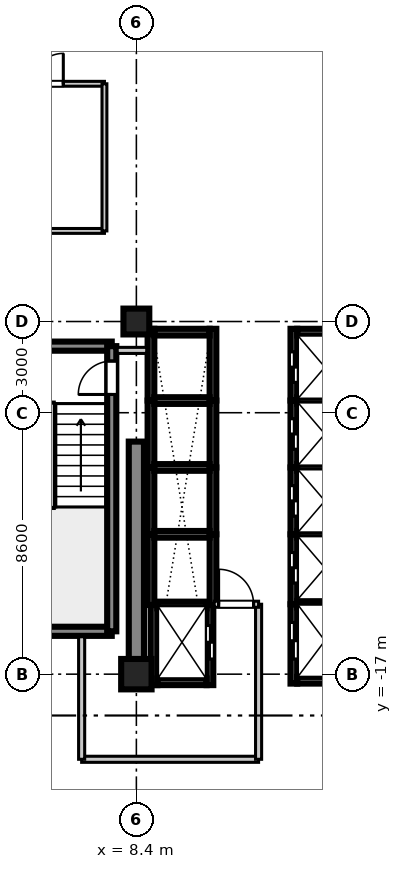
"""IFC4 building model, lengths in metres.
Left out: names, types, materials, properties, quantities, classifications, styles, units other than length and angle.
Written with IfcOpenShell. Run it as: python <this file> out.ifc"""

import sys

from ifc_helpers import new_model, si_unit, direction, frame, frame_2d, origin, origin_2d, place, context, subcontext, project, spatial, rectangle, extrude, source, transform, mapped, element, fill, save


model = new_model("IFC4")
c1 = context("Model", 3, precision=1e-05, world=origin(), true_north=direction((0.0, 1.0)))
c2 = subcontext(c1, "Body", "Model", "MODEL_VIEW")
j1 = project(units=[si_unit("LENGTHUNIT", "METRE"), si_unit("PLANEANGLEUNIT", "RADIAN")], contexts=[c1])
p1 = place(None, origin())
s1 = spatial("IfcSite", under=j1, at=p1, CompositionType="ELEMENT")
p2 = place(p1, origin())
s2 = spatial("IfcBuilding", under=s1, at=p2, CompositionType="ELEMENT")
p3 = place(p2, frame((0.0, 0.0, 204.9)))
s3 = spatial("IfcBuildingStorey", under=s2, at=p3, CompositionType="ELEMENT", Elevation=204.9)
m1 = source(origin(), c2, "Body", "SweptSolid", [
    extrude(rectangle(XDim=1.0, YDim=1.0, at=origin_2d()), origin(), (0.0, 0.0, 1.0), 3.655),
])
p4 = place(p3, frame((8.4, -17.0, 0.0), z_axis=(0.0, 0.0, 1.0), x_axis=(1.0, 0.0, 0.0)))
e1 = element("IfcColumn", 1, at=p4, inside=s3, PredefinedType="COLUMN", context=c2, shape_type="MappedRepresentation", body=[
    mapped(m1, transform((0.0, 0.0, 0.0), scale=1.0)),
])
m2 = source(origin(), c2, "Body", "SweptSolid", [
    extrude(rectangle(XDim=0.85, YDim=0.85, at=origin_2d()), origin(), (0.0, 0.0, 1.0), 3.655),
])
p5 = place(p3, frame((8.4, -5.4, 0.0), z_axis=(0.0, 0.0, 1.0), x_axis=(1.0, 0.0, 0.0)))
e2 = element("IfcColumn", 2, at=p5, inside=s3, PredefinedType="PILASTER", context=c2, shape_type="MappedRepresentation", body=[
    mapped(m2, transform((0.0, 0.0, 0.0), scale=1.0)),
])
m3 = source(origin(), c2, "Body", "SweptSolid", [
    extrude(rectangle(XDim=7.65, YDim=0.5, at=frame_2d((3.825, 0.0))), origin(), (0.0, 0.0, 1.0), 3.41),
])
p6 = place(p3, frame((8.4, -17.0, 0.0), z_axis=(0.0, 0.0, 1.0), x_axis=(0.0, 1.0, 0.0)))
e3 = element("IfcWall", 3, at=p6, inside=s3, PredefinedType="SHEAR", context=c2, shape_type="MappedRepresentation", body=[
    mapped(m3, transform((0.0, 0.0, 0.0), scale=1.0)),
])
m4 = source(origin(), c2, "Body", "SweptSolid", [
    extrude(rectangle(XDim=3.98, YDim=0.3, at=frame_2d((1.99, 0.0))), origin(), (0.0, 0.0, 1.0), 3.41),
])
for number, where, z_axis, x_axis in (
    (4, (3.61, -15.59, 0.0), (0.0, 0.0, 1.0), (1.0, 0.0, 0.0)),
    (5, (3.61, -6.21, 0.0), (0.0, 0.0, 1.0), (1.0, 0.0, 0.0)),
):
    element("IfcWall", number, at=place(p3, frame(where, z_axis=z_axis, x_axis=x_axis)), inside=s3, PredefinedType="SHEAR", context=c2, shape_type="MappedRepresentation", body=[
        mapped(m4, transform((0.0, 0.0, 0.0), scale=1.0)),
    ])
m5 = source(origin(), c2, "Body", "SweptSolid", [
    extrude(rectangle(XDim=9.38, YDim=0.3, at=frame_2d((4.69, 0.0))), origin(), (0.0, 0.0, 1.0), 3.41),
])
p7 = place(p3, frame((7.59, -15.59, 0.0), z_axis=(0.0, 0.0, 1.0), x_axis=(0.0, 1.0, 0.0)))
e6 = element("IfcWall", 6, at=p7, inside=s3, PredefinedType="SHEAR", context=c2, shape_type="MappedRepresentation", body=[
    mapped(m5, transform((0.0, 0.0, 0.0), scale=1.0)),
])
p8 = place(p7, frame((7.79, 0.0, 0.0)))
e7 = element("IfcOpeningElement", 7, at=p8, cuts=e6, PredefinedType="OPENING", context=c2, shape_type="SweptSolid", body=[
    extrude(rectangle(XDim=1.1, YDim=2.15, at=frame_2d((0.55, 1.075))), frame((0.0, 0.16, 0.0), z_axis=(0.0, -1.0, 0.0), x_axis=(1.0, 0.0, 0.0)), (0.0, 0.0, 1.0), 0.32),
])
m6 = source(origin(), c2, "Body", "SweptSolid", [
    extrude(rectangle(XDim=2.36, YDim=0.22, at=frame_2d((1.18, 0.0))), origin(), (0.0, 0.0, 1.0), 3.41),
])
p9 = place(p3, frame((13.58, -8.0, 0.0), z_axis=(0.0, 0.0, 1.0), x_axis=(0.0, 1.0, 0.0)))
e8 = element("IfcWall", 8, at=p9, inside=s3, PredefinedType="SHEAR", context=c2, shape_type="MappedRepresentation", body=[
    mapped(m6, transform((0.0, 0.0, 0.0), scale=1.0)),
])
p10 = place(p9, frame((0.6, 0.0, 0.0)))
e9 = element("IfcOpeningElement", 9, at=p10, cuts=e8, PredefinedType="OPENING", context=c2, shape_type="SweptSolid", body=[
    extrude(rectangle(XDim=1.0, YDim=2.2, at=frame_2d((0.5, 1.1))), frame((0.0, 0.12, 0.0), z_axis=(0.0, -1.0, 0.0), x_axis=(1.0, 0.0, 0.0)), (0.0, 0.0, 1.0), 0.24),
])
m7 = source(origin(), c2, "Body", "SweptSolid", [
    extrude(rectangle(XDim=1.82, YDim=0.22, at=frame_2d((0.91, 0.0))), origin(), (0.0, 0.0, 1.0), 3.41),
])
p11 = place(p3, frame((13.69, -5.75, 0.0), z_axis=(0.0, 0.0, 1.0), x_axis=(1.0, 0.0, 0.0)))
e10 = element("IfcWall", 10, at=p11, inside=s3, PredefinedType="SHEAR", context=c2, shape_type="MappedRepresentation", body=[
    mapped(m7, transform((0.0, 0.0, 0.0), scale=1.0)),
])
m8 = source(origin(), c2, "Body", "SweptSolid", [
    extrude(rectangle(XDim=2.2, YDim=0.22, at=frame_2d((1.1, 0.0))), origin(), (0.0, 0.0, 1.0), 3.41),
])
p12 = place(p3, frame((13.58, -10.2, 0.0), z_axis=(0.0, 0.0, 1.0), x_axis=(0.0, 1.0, 0.0)))
e11 = element("IfcWall", 11, at=p12, inside=s3, PredefinedType="SHEAR", context=c2, shape_type="MappedRepresentation", body=[
    mapped(m8, transform((0.0, 0.0, 0.0), scale=1.0)),
])
p13 = place(p12, frame((0.6, 0.0, 0.0)))
e12 = element("IfcOpeningElement", 12, at=p13, cuts=e11, PredefinedType="OPENING", context=c2, shape_type="SweptSolid", body=[
    extrude(rectangle(XDim=1.0, YDim=2.2, at=frame_2d((0.5, 1.1))), frame((0.0, 0.12, 0.0), z_axis=(0.0, -1.0, 0.0), x_axis=(1.0, 0.0, 0.0)), (0.0, 0.0, 1.0), 0.24),
])
m9 = source(origin(), c2, "Body", "SweptSolid", [
    extrude(rectangle(XDim=1.82, YDim=0.22, at=frame_2d((0.91, 0.0))), origin(), (0.0, 0.0, 1.0), 3.7),
])
p14 = place(p3, frame((13.69, -8.0, 0.0), z_axis=(0.0, 0.0, 1.0), x_axis=(1.0, 0.0, 0.0)))
e13 = element("IfcWall", 13, at=p14, inside=s3, PredefinedType="SHEAR", context=c2, shape_type="MappedRepresentation", body=[
    mapped(m9, transform((0.0, 0.0, 0.0), scale=1.0)),
])
p15 = place(p3, frame((13.58, -12.4, 0.0), z_axis=(0.0, 0.0, 1.0), x_axis=(0.0, 1.0, 0.0)))
e14 = element("IfcWall", 14, at=p15, inside=s3, PredefinedType="SHEAR", context=c2, shape_type="MappedRepresentation", body=[
    mapped(m8, transform((0.0, 0.0, 0.0), scale=1.0)),
])
p16 = place(p15, frame((0.6, 0.0, 0.0)))
e15 = element("IfcOpeningElement", 15, at=p16, cuts=e14, PredefinedType="OPENING", context=c2, shape_type="SweptSolid", body=[
    extrude(rectangle(XDim=1.0, YDim=2.2, at=frame_2d((0.5, 1.1))), frame((0.0, 0.12, 0.0), z_axis=(0.0, -1.0, 0.0), x_axis=(1.0, 0.0, 0.0)), (0.0, 0.0, 1.0), 0.24),
])
p17 = place(p3, frame((13.69, -10.2, 0.0), z_axis=(0.0, 0.0, 1.0), x_axis=(1.0, 0.0, 0.0)))
e16 = element("IfcWall", 16, at=p17, inside=s3, PredefinedType="SHEAR", context=c2, shape_type="MappedRepresentation", body=[
    mapped(m9, transform((0.0, 0.0, 0.0), scale=1.0)),
])
m10 = source(origin(), c2, "Body", "SweptSolid", [
    extrude(rectangle(XDim=2.3, YDim=0.22, at=frame_2d((1.15, 0.0))), origin(), (0.0, 0.0, 1.0), 3.41),
])
p18 = place(p3, frame((13.58, -14.7, 0.0), z_axis=(0.0, 0.0, 1.0), x_axis=(0.0, 1.0, 0.0)))
e17 = element("IfcWall", 17, at=p18, inside=s3, PredefinedType="SHEAR", context=c2, shape_type="MappedRepresentation", body=[
    mapped(m10, transform((0.0, 0.0, 0.0), scale=1.0)),
])
p19 = place(p18, frame((0.7, 0.0, 0.0)))
e18 = element("IfcOpeningElement", 18, at=p19, cuts=e17, PredefinedType="OPENING", context=c2, shape_type="SweptSolid", body=[
    extrude(rectangle(XDim=1.0, YDim=2.2, at=frame_2d((0.5, 1.1))), frame((0.0, 0.12, 0.0), z_axis=(0.0, -1.0, 0.0), x_axis=(1.0, 0.0, 0.0)), (0.0, 0.0, 1.0), 0.24),
])
p20 = place(p3, frame((13.69, -12.4, 0.0), z_axis=(0.0, 0.0, 1.0), x_axis=(1.0, 0.0, 0.0)))
e19 = element("IfcWall", 19, at=p20, inside=s3, PredefinedType="SHEAR", context=c2, shape_type="MappedRepresentation", body=[
    mapped(m9, transform((0.0, 0.0, 0.0), scale=1.0)),
])
for number, where, z_axis, x_axis in (
    (20, (8.88, -8.0, 0.0), (0.0, 0.0, 1.0), (0.0, 1.0, 0.0)),
    (21, (10.92, -8.0, 0.0), (0.0, 0.0, 1.0), (0.0, 1.0, 0.0)),
):
    element("IfcWall", number, at=place(p3, frame(where, z_axis=z_axis, x_axis=x_axis)), inside=s3, PredefinedType="SHEAR", context=c2, shape_type="MappedRepresentation", body=[
        mapped(m6, transform((0.0, 0.0, 0.0), scale=1.0)),
    ])
p21 = place(p3, frame((8.99, -5.75, 0.0), z_axis=(0.0, 0.0, 1.0), x_axis=(1.0, 0.0, 0.0)))
e22 = element("IfcWall", 22, at=p21, inside=s3, PredefinedType="SHEAR", context=c2, shape_type="MappedRepresentation", body=[
    mapped(m7, transform((0.0, 0.0, 0.0), scale=1.0)),
])
for number, where, z_axis, x_axis in (
    (23, (8.88, -10.2, 0.0), (0.0, 0.0, 1.0), (0.0, 1.0, 0.0)),
    (24, (10.92, -10.2, 0.0), (0.0, 0.0, 1.0), (0.0, 1.0, 0.0)),
):
    element("IfcWall", number, at=place(p3, frame(where, z_axis=z_axis, x_axis=x_axis)), inside=s3, PredefinedType="SHEAR", context=c2, shape_type="MappedRepresentation", body=[
        mapped(m8, transform((0.0, 0.0, 0.0), scale=1.0)),
    ])
p22 = place(p3, frame((8.99, -8.0, 0.0), z_axis=(0.0, 0.0, 1.0), x_axis=(1.0, 0.0, 0.0)))
e25 = element("IfcWall", 25, at=p22, inside=s3, PredefinedType="SHEAR", context=c2, shape_type="MappedRepresentation", body=[
    mapped(m9, transform((0.0, 0.0, 0.0), scale=1.0)),
])
for number, where, z_axis, x_axis in (
    (26, (8.88, -12.4, 0.0), (0.0, 0.0, 1.0), (0.0, 1.0, 0.0)),
    (27, (10.92, -12.4, 0.0), (0.0, 0.0, 1.0), (0.0, 1.0, 0.0)),
):
    element("IfcWall", number, at=place(p3, frame(where, z_axis=z_axis, x_axis=x_axis)), inside=s3, PredefinedType="SHEAR", context=c2, shape_type="MappedRepresentation", body=[
        mapped(m8, transform((0.0, 0.0, 0.0), scale=1.0)),
    ])
p23 = place(p3, frame((8.99, -10.2, 0.0), z_axis=(0.0, 0.0, 1.0), x_axis=(1.0, 0.0, 0.0)))
e28 = element("IfcWall", 28, at=p23, inside=s3, PredefinedType="SHEAR", context=c2, shape_type="MappedRepresentation", body=[
    mapped(m9, transform((0.0, 0.0, 0.0), scale=1.0)),
])
m11 = source(origin(), c2, "Body", "SweptSolid", [
    extrude(rectangle(XDim=2.325, YDim=0.22, at=frame_2d((1.163, 0.0))), origin(), (0.0, 0.0, 1.0), 3.41),
])
for number, where, z_axis, x_axis in (
    (29, (8.88, -14.725, 0.0), (0.0, 0.0, 1.0), (0.0, 1.0, 0.0)),
    (30, (10.92, -14.725, 0.0), (0.0, 0.0, 1.0), (0.0, 1.0, 0.0)),
):
    element("IfcWall", number, at=place(p3, frame(where, z_axis=z_axis, x_axis=x_axis)), inside=s3, PredefinedType="SHEAR", context=c2, shape_type="MappedRepresentation", body=[
        mapped(m11, transform((0.0, 0.0, 0.0), scale=1.0)),
    ])
p24 = place(p3, frame((8.99, -12.4, 0.0), z_axis=(0.0, 0.0, 1.0), x_axis=(1.0, 0.0, 0.0)))
e31 = element("IfcWall", 31, at=p24, inside=s3, PredefinedType="SHEAR", context=c2, shape_type="MappedRepresentation", body=[
    mapped(m9, transform((0.0, 0.0, 0.0), scale=1.0)),
])
m12 = source(origin(), c2, "Body", "SweptSolid", [
    extrude(rectangle(XDim=2.635, YDim=0.22, at=frame_2d((1.317, 0.0))), origin(), (0.0, 0.0, 1.0), 3.41),
])
p25 = place(p3, frame((8.98, -17.36, 0.0), z_axis=(0.0, 0.0, 1.0), x_axis=(0.0, 1.0, 0.0)))
e32 = element("IfcWall", 32, at=p25, inside=s3, PredefinedType="SHEAR", context=c2, shape_type="MappedRepresentation", body=[
    mapped(m12, transform((0.0, 0.0, 0.0), scale=1.0)),
])
p26 = place(p3, frame((10.82, -17.36, 0.0), z_axis=(0.0, 0.0, 1.0), x_axis=(0.0, 1.0, 0.0)))
e33 = element("IfcWall", 33, at=p26, inside=s3, PredefinedType="SHEAR", context=c2, shape_type="MappedRepresentation", body=[
    mapped(m12, transform((0.0, 0.0, 0.0), scale=1.0)),
])
p27 = place(p26, frame((0.86, 0.0, 0.0)))
e34 = element("IfcOpeningElement", 34, at=p27, cuts=e33, PredefinedType="OPENING", context=c2, shape_type="SweptSolid", body=[
    extrude(rectangle(XDim=1.1, YDim=2.2, at=frame_2d((0.55, 1.1))), frame((0.0, 0.12, 0.0), z_axis=(0.0, -1.0, 0.0), x_axis=(1.0, 0.0, 0.0)), (0.0, 0.0, 1.0), 0.24),
])
m13 = source(origin(), c2, "Body", "SweptSolid", [
    extrude(rectangle(XDim=1.62, YDim=0.22, at=frame_2d((0.81, 0.0))), origin(), (0.0, 0.0, 1.0), 3.41),
])
p28 = place(p3, frame((9.09, -17.25, 0.0), z_axis=(0.0, 0.0, 1.0), x_axis=(1.0, 0.0, 0.0)))
e35 = element("IfcWall", 35, at=p28, inside=s3, PredefinedType="SHEAR", context=c2, shape_type="MappedRepresentation", body=[
    mapped(m13, transform((0.0, 0.0, 0.0), scale=1.0)),
])
m14 = source(origin(), c2, "Body", "SweptSolid", [
    extrude(rectangle(XDim=1.62, YDim=0.22, at=frame_2d((0.81, 0.0))), origin(), (0.0, 0.0, 1.0), 3.7),
])
p29 = place(p3, frame((9.09, -14.725, 0.0), z_axis=(0.0, 0.0, 1.0), x_axis=(1.0, 0.0, 0.0)))
e36 = element("IfcWall", 36, at=p29, inside=s3, PredefinedType="SHEAR", context=c2, shape_type="MappedRepresentation", body=[
    mapped(m14, transform((0.0, 0.0, 0.0), scale=1.0)),
])
m15 = source(origin(), c2, "Body", "SweptSolid", [
    extrude(rectangle(XDim=2.61, YDim=0.22, at=frame_2d((1.305, 0.0))), origin(), (0.0, 0.0, 1.0), 3.41),
])
p30 = place(p3, frame((13.58, -17.31, 0.0), z_axis=(0.0, 0.0, 1.0), x_axis=(0.0, 1.0, 0.0)))
e37 = element("IfcWall", 37, at=p30, inside=s3, PredefinedType="SHEAR", context=c2, shape_type="MappedRepresentation", body=[
    mapped(m15, transform((0.0, 0.0, 0.0), scale=1.0)),
])
p31 = place(p30, frame((0.81, 0.0, 0.0)))
e38 = element("IfcOpeningElement", 38, at=p31, cuts=e37, PredefinedType="OPENING", context=c2, shape_type="SweptSolid", body=[
    extrude(rectangle(XDim=1.2, YDim=2.2, at=frame_2d((0.6, 1.1))), frame((0.0, 0.12, 0.0), z_axis=(0.0, -1.0, 0.0), x_axis=(1.0, 0.0, 0.0)), (0.0, 0.0, 1.0), 0.24),
])
p32 = place(p3, frame((13.69, -17.2, 0.0), z_axis=(0.0, 0.0, 1.0), x_axis=(1.0, 0.0, 0.0)))
e39 = element("IfcWall", 39, at=p32, inside=s3, PredefinedType="SHEAR", context=c2, shape_type="MappedRepresentation", body=[
    mapped(m7, transform((0.0, 0.0, 0.0), scale=1.0)),
])
p33 = place(p3, frame((13.69, -14.7, 0.0), z_axis=(0.0, 0.0, 1.0), x_axis=(1.0, 0.0, 0.0)))
e40 = element("IfcWall", 40, at=p33, inside=s3, PredefinedType="SHEAR", context=c2, shape_type="MappedRepresentation", body=[
    mapped(m9, transform((0.0, 0.0, 0.0), scale=1.0)),
])
m16 = source(origin(), c2, "Body", "SweptSolid", [
    extrude(rectangle(XDim=5.82, YDim=0.2, at=frame_2d((2.91, 0.0))), origin(), (0.0, 0.0, 1.0), 2.75),
])
p34 = place(p3, frame((6.6, -19.8, 0.0), z_axis=(0.0, 0.0, 1.0), x_axis=(1.0, 0.0, 0.0)))
e41 = element("IfcWall", 41, at=p34, inside=s3, PredefinedType="PARTITIONING", context=c2, shape_type="MappedRepresentation", body=[
    mapped(m16, transform((0.0, 0.0, 0.0), scale=1.0)),
])
m17 = source(origin(), c2, "Body", "SweptSolid", [
    extrude(rectangle(XDim=4.03, YDim=0.2, at=frame_2d((2.015, 0.0))), origin(), (0.0, 0.0, 1.0), 2.75),
])
p35 = place(p3, frame((6.6, -19.8, 0.0), z_axis=(0.0, 0.0, 1.0), x_axis=(0.0, 1.0, 0.0)))
e42 = element("IfcWall", 42, at=p35, inside=s3, PredefinedType="PARTITIONING", context=c2, shape_type="MappedRepresentation", body=[
    mapped(m17, transform((0.0, 0.0, 0.0), scale=1.0)),
])
m18 = source(origin(), c2, "Body", "SweptSolid", [
    extrude(rectangle(XDim=5.1, YDim=0.2, at=frame_2d((2.55, 0.0))), origin(), (0.0, 0.0, 1.0), 2.75),
])
p36 = place(p3, frame((12.42, -19.8, 0.0), z_axis=(0.0, 0.0, 1.0), x_axis=(0.0, 1.0, 0.0)))
e43 = element("IfcWall", 43, at=p36, inside=s3, PredefinedType="PARTITIONING", context=c2, shape_type="MappedRepresentation", body=[
    mapped(m18, transform((0.0, 0.0, 0.0), scale=1.0)),
])
m19 = source(origin(), c2, "Body", "SweptSolid", [
    extrude(rectangle(XDim=1.46, YDim=0.2, at=frame_2d((0.73, 0.0))), origin(), (0.0, 0.0, 1.0), 2.75),
])
p37 = place(p3, frame((10.96, -14.7, 0.0), z_axis=(0.0, 0.0, 1.0), x_axis=(1.0, 0.0, 0.0)))
e44 = element("IfcWall", 44, at=p37, inside=s3, PredefinedType="PARTITIONING", context=c2, shape_type="MappedRepresentation", body=[
    mapped(m19, transform((0.0, 0.0, 0.0), scale=1.0)),
])
p38 = place(p37, frame((0.145, 0.0, 0.0)))
e45 = element("IfcOpeningElement", 45, at=p38, cuts=e44, PredefinedType="OPENING", context=c2, shape_type="SweptSolid", body=[
    extrude(rectangle(XDim=1.15, YDim=2.15, at=frame_2d((0.575, 1.075))), frame((0.0, 0.11, 0.0), z_axis=(0.0, -1.0, 0.0), x_axis=(1.0, 0.0, 0.0)), (0.0, 0.0, 1.0), 0.22),
])
m20 = source(origin(), c2, "Body", "SweptSolid", [
    extrude(rectangle(XDim=0.97, YDim=0.2, at=frame_2d((0.485, 0.0))), origin(), (0.0, 0.0, 1.0), 2.75),
])
p39 = place(p3, frame((7.77, -6.35, 0.0), z_axis=(0.0, 0.0, 1.0), x_axis=(1.0, 0.0, 0.0)))
e46 = element("IfcWall", 46, at=p39, inside=s3, PredefinedType="PARTITIONING", context=c2, shape_type="MappedRepresentation", body=[
    mapped(m20, transform((0.0, 0.0, 0.0), scale=1.0)),
])
m21 = source(origin(), c2, "Body", "SweptSolid", [
    extrude(rectangle(XDim=6.732, YDim=0.16, at=frame_2d((3.366, 0.0))), origin(), (0.0, 0.0, 1.0), 2.75),
])
p40 = place(p3, frame((0.618, -2.42, 0.0), z_axis=(0.0, 0.0, 1.0), x_axis=(1.0, 0.0, 0.0)))
e47 = element("IfcWall", 47, at=p40, inside=s3, PredefinedType="PARTITIONING", context=c2, shape_type="MappedRepresentation", body=[
    mapped(m21, transform((0.0, 0.0, 0.0), scale=1.0)),
])
p41 = place(p3, frame((0.618, 2.42, 0.0), z_axis=(0.0, 0.0, 1.0), x_axis=(1.0, 0.0, 0.0)))
e48 = element("IfcWall", 48, at=p41, inside=s3, PredefinedType="PARTITIONING", context=c2, shape_type="MappedRepresentation", body=[
    mapped(m21, transform((0.0, 0.0, 0.0), scale=1.0)),
])
p42 = place(p41, frame((4.379, 0.0, 0.0)))
e49 = element("IfcOpeningElement", 49, at=p42, cuts=e48, PredefinedType="OPENING", context=c2, shape_type="SweptSolid", body=[
    extrude(rectangle(XDim=1.0, YDim=2.1, at=frame_2d((0.5, 1.05))), frame((0.0, 0.09, 0.0), z_axis=(0.0, -1.0, 0.0), x_axis=(1.0, 0.0, 0.0)), (0.0, 0.0, 1.0), 0.18),
])
m22 = source(origin(), c2, "Body", "SweptSolid", [
    extrude(rectangle(XDim=4.84, YDim=0.16, at=frame_2d((2.42, 0.0))), origin(), (0.0, 0.0, 1.0), 2.75),
])
p43 = place(p3, frame((7.35, -2.42, 0.0), z_axis=(0.0, 0.0, 1.0), x_axis=(0.0, 1.0, 0.0)))
e50 = element("IfcWall", 50, at=p43, inside=s3, PredefinedType="PARTITIONING", context=c2, shape_type="MappedRepresentation", body=[
    mapped(m22, transform((0.0, 0.0, 0.0), scale=1.0)),
])
m23 = source(origin(), c2, "Body", "SweptSolid", [
    extrude(rectangle(XDim=1.1, YDim=2.15, at=frame_2d((0.55, 1.075))), frame((0.0, 0.025, 0.0), z_axis=(0.0, -1.0, 0.0), x_axis=(1.0, 0.0, 0.0)), (0.0, 0.0, 1.0), 0.05),
])
p44 = place(p8, origin())
e51 = element("IfcDoor", 51, at=p44, inside=s3, OperationType="SINGLE_SWING_LEFT", PredefinedType="DOOR", context=c2, shape_type="MappedRepresentation", body=[
    mapped(m23, transform((0.0, 0.0, 0.0), scale=1.0)),
])
fill(e7, e51)
m24 = source(origin(), c2, "Body", "SweptSolid", [
    extrude(rectangle(XDim=1.0, YDim=2.2, at=frame_2d((0.5, 1.1))), frame((0.0, 0.025, 0.0), z_axis=(0.0, -1.0, 0.0), x_axis=(1.0, 0.0, 0.0)), (0.0, 0.0, 1.0), 0.05),
])
p45 = place(p10, origin())
e52 = element("IfcDoor", 52, at=p45, inside=s3, OperationType="DOUBLE_DOOR_SLIDING", PredefinedType="DOOR", context=c2, shape_type="MappedRepresentation", body=[
    mapped(m24, transform((0.0, 0.0, 0.0), scale=1.0)),
])
fill(e9, e52)
p46 = place(p13, origin())
e53 = element("IfcDoor", 53, at=p46, inside=s3, OperationType="DOUBLE_DOOR_SLIDING", PredefinedType="DOOR", context=c2, shape_type="MappedRepresentation", body=[
    mapped(m24, transform((0.0, 0.0, 0.0), scale=1.0)),
])
fill(e12, e53)
p47 = place(p16, origin())
e54 = element("IfcDoor", 54, at=p47, inside=s3, OperationType="DOUBLE_DOOR_SLIDING", PredefinedType="DOOR", context=c2, shape_type="MappedRepresentation", body=[
    mapped(m24, transform((0.0, 0.0, 0.0), scale=1.0)),
])
fill(e15, e54)
p48 = place(p19, origin())
e55 = element("IfcDoor", 55, at=p48, inside=s3, OperationType="DOUBLE_DOOR_SLIDING", PredefinedType="DOOR", context=c2, shape_type="MappedRepresentation", body=[
    mapped(m24, transform((0.0, 0.0, 0.0), scale=1.0)),
])
fill(e18, e55)
m25 = source(origin(), c2, "Body", "SweptSolid", [
    extrude(rectangle(XDim=1.1, YDim=2.2, at=frame_2d((0.55, 1.1))), frame((0.0, 0.025, 0.0), z_axis=(0.0, -1.0, 0.0), x_axis=(1.0, 0.0, 0.0)), (0.0, 0.0, 1.0), 0.05),
])
p49 = place(p27, frame((1.1, 0.0, 0.0), z_axis=(0.0, 0.0, 1.0), x_axis=(-1.0, 0.0, 0.0)))
e56 = element("IfcDoor", 56, at=p49, inside=s3, OperationType="DOUBLE_DOOR_SLIDING", PredefinedType="DOOR", context=c2, shape_type="MappedRepresentation", body=[
    mapped(m25, transform((0.0, 0.0, 0.0), scale=1.0)),
])
fill(e34, e56)
m26 = source(origin(), c2, "Body", "SweptSolid", [
    extrude(rectangle(XDim=1.2, YDim=2.2, at=frame_2d((0.6, 1.1))), frame((0.0, 0.025, 0.0), z_axis=(0.0, -1.0, 0.0), x_axis=(1.0, 0.0, 0.0)), (0.0, 0.0, 1.0), 0.05),
])
p50 = place(p31, origin())
e57 = element("IfcDoor", 57, at=p50, inside=s3, OperationType="DOUBLE_DOOR_SLIDING", PredefinedType="DOOR", context=c2, shape_type="MappedRepresentation", body=[
    mapped(m26, transform((0.0, 0.0, 0.0), scale=1.0)),
])
fill(e38, e57)
m27 = source(origin(), c2, "Body", "SweptSolid", [
    extrude(rectangle(XDim=1.15, YDim=2.15, at=frame_2d((0.575, 1.075))), frame((0.0, 0.025, 0.0), z_axis=(0.0, -1.0, 0.0), x_axis=(1.0, 0.0, 0.0)), (0.0, 0.0, 1.0), 0.05),
])
p51 = place(p38, origin())
e58 = element("IfcDoor", 58, at=p51, inside=s3, OperationType="SINGLE_SWING_LEFT", PredefinedType="DOOR", context=c2, shape_type="MappedRepresentation", body=[
    mapped(m27, transform((0.0, 0.0, 0.0), scale=1.0)),
])
fill(e45, e58)
m28 = source(origin(), c2, "Body", "SweptSolid", [
    extrude(rectangle(XDim=1.0, YDim=2.1, at=frame_2d((0.5, 1.05))), frame((0.0, 0.025, 0.0), z_axis=(0.0, -1.0, 0.0), x_axis=(1.0, 0.0, 0.0)), (0.0, 0.0, 1.0), 0.05),
])
p52 = place(p42, frame((1.0, 0.0, 0.0), z_axis=(0.0, 0.0, 1.0), x_axis=(-1.0, 0.0, 0.0)))
e59 = element("IfcDoor", 59, at=p52, inside=s3, OperationType="SINGLE_SWING_RIGHT", PredefinedType="DOOR", context=c2, shape_type="MappedRepresentation", body=[
    mapped(m28, transform((0.0, 0.0, 0.0), scale=1.0)),
])
fill(e49, e59)
save(model, sys.argv[1])
